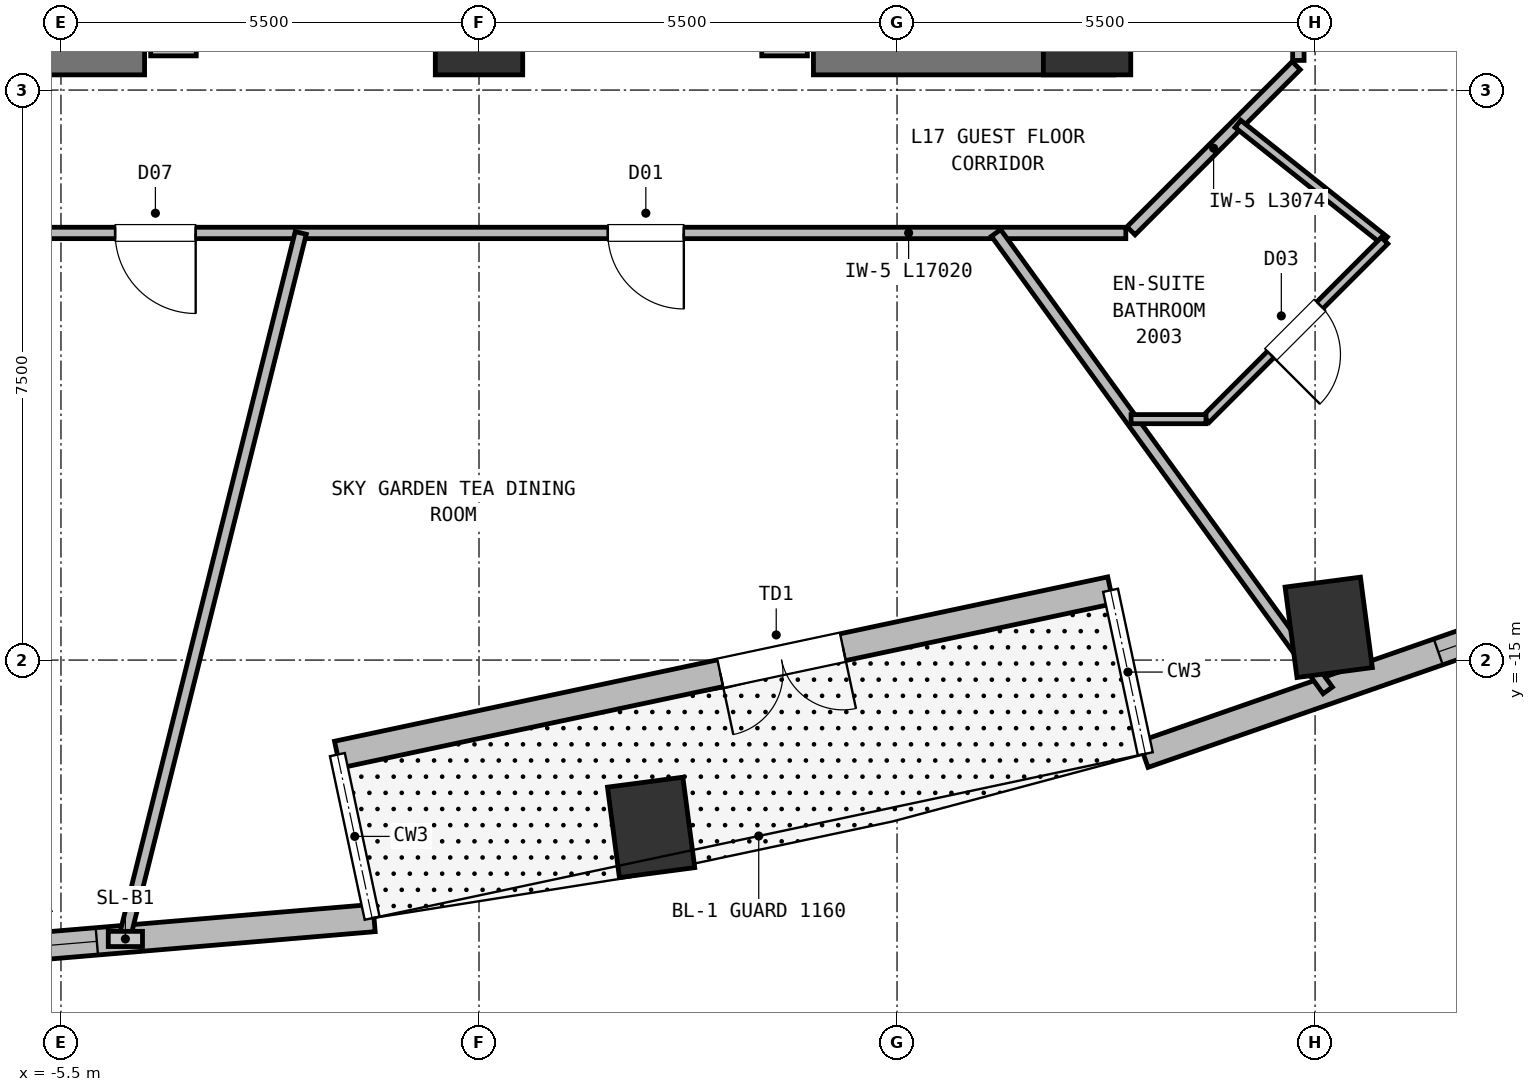
"""IFC4 building model, lengths in metres.
Left out: names, types, materials, properties, quantities, classifications, styles, units other than length and angle.
Written with IfcOpenShell. Run it as: python <this file> out.ifc"""

import sys

from ifc_helpers import new_model, si_unit, direction, frame, frame_2d, origin, origin_2d, place, context, subcontext, project, spatial, rectangle, extrude, element, fill, save


model = new_model("IFC4")
c1 = context("Model", 3, precision=1e-05, world=origin(), true_north=direction((0.0, 1.0)))
c2 = subcontext(c1, "Body", "Model", "MODEL_VIEW")
j1 = project(units=[si_unit("LENGTHUNIT", "METRE"), si_unit("PLANEANGLEUNIT", "RADIAN")], contexts=[c1])
p1 = place(None, origin())
s1 = spatial("IfcSite", under=j1, at=p1, CompositionType="ELEMENT")
p2 = place(p1, origin())
s2 = spatial("IfcBuilding", under=s1, at=p2, CompositionType="ELEMENT")
p3 = place(p2, frame((0.0, 0.0, 71.75)))
s3 = spatial("IfcBuildingStorey", under=s2, at=p3, CompositionType="ELEMENT", Elevation=71.75)
for number, where, z_axis, x_axis in (
    (1, (0.0, -6.6, 0.0), (0.0, 0.0, 1.0), (1.0, 0.0, 0.0)),
    (2, (8.0, -6.6, 0.0), (0.0, 0.0, 1.0), (1.0, 0.0, 0.0)),
):
    element("IfcColumn", number, at=place(p3, frame(where, z_axis=z_axis, x_axis=x_axis)), inside=s3, PredefinedType="COLUMN", context=c2, shape_type="SweptSolid", body=[
        extrude(rectangle(XDim=1.15, YDim=1.4, at=origin_2d()), origin(), (0.0, 0.0, 1.0), 3.75),
    ])
for number, where, z_axis, x_axis in (
    (3, (-8.35, -6.95, 0.0), (0.0, 0.0, 1.0), (1.0, 0.0, 0.0)),
    (4, (4.4, -6.95, 0.0), (0.0, 0.0, 1.0), (1.0, 0.0, 0.0)),
):
    element("IfcWall", number, at=place(p3, frame(where, z_axis=z_axis, x_axis=x_axis)), inside=s3, PredefinedType="SHEAR", context=c2, shape_type="SweptSolid", body=[
        extrude(rectangle(XDim=3.95, YDim=0.7, at=frame_2d((1.975, 0.0))), origin(), (0.0, 0.0, 1.0), 3.5),
    ])
for number, where, z_axis, x_axis in (
    (5, (2.265, -17.202, 0.0), (0.0, 0.0, 1.0), (0.991, 0.131, 0.0)),
    (6, (11.179, -14.569, 0.0), (0.0, 0.0, 1.0), (0.991, 0.131, 0.0)),
):
    element("IfcColumn", number, at=place(p3, frame(where, z_axis=z_axis, x_axis=x_axis)), inside=s3, PredefinedType="COLUMN", context=c2, shape_type="SweptSolid", body=[
        extrude(rectangle(XDim=1.0, YDim=1.2, at=origin_2d()), origin(), (0.0, 0.0, 1.0), 3.75),
    ])
p4 = place(p3, frame((8.309, -14.082, 0.0), z_axis=(0.0, 0.0, 1.0), x_axis=(-0.978145663611, -0.207920804056, 0.0)))
e7 = element("IfcWall", 7, at=p4, inside=s3, PredefinedType="SOLIDWALL", context=c2, shape_type="SweptSolid", body=[
    extrude(rectangle(XDim=10.4, YDim=0.36, at=frame_2d((5.2, 0.0))), origin(), (0.0, 0.0, 1.0), 3.5),
])
p5 = place(p4, frame((3.6, 0.0, 0.0)))
e8 = element("IfcOpeningElement", 8, at=p5, cuts=e7, PredefinedType="OPENING", context=c2, shape_type="SweptSolid", body=[
    extrude(rectangle(XDim=1.65, YDim=2.25, at=frame_2d((0.825, 1.125))), frame((0.0, 0.19, 0.0), z_axis=(0.0, -1.0, 0.0), x_axis=(1.0, 0.0, 0.0)), (0.0, 0.0, 1.0), 0.38),
])
p6 = place(p3, frame((-1.381, -18.394, 0.0), z_axis=(0.0, 0.0, 1.0), x_axis=(-0.996472288139, -0.083922458089, 0.0)))
e9 = element("IfcWall", 9, at=p6, inside=s3, PredefinedType="SOLIDWALL", context=c2, shape_type="SweptSolid", body=[
    extrude(rectangle(XDim=6.566, YDim=0.36, at=frame_2d((3.283, 0.0))), origin(), (0.0, 0.0, 1.0), 3.5),
])
p7 = place(p6, frame((3.66, 0.0, 0.72)))
e10 = element("IfcOpeningElement", 10, at=p7, cuts=e9, PredefinedType="OPENING", context=c2, shape_type="SweptSolid", body=[
    extrude(rectangle(XDim=1.6, YDim=1.88, at=frame_2d((0.8, 0.94))), frame((0.0, 0.19, 0.0), z_axis=(0.0, -1.0, 0.0), x_axis=(1.0, 0.0, 0.0)), (0.0, 0.0, 1.0), 0.38),
])
p8 = place(p3, frame((14.944, -14.084, 0.0), z_axis=(0.0, 0.0, 1.0), x_axis=(-0.944459669929, -0.328627344993, 0.0)))
e11 = element("IfcWall", 11, at=p8, inside=s3, PredefinedType="SOLIDWALL", context=c2, shape_type="SweptSolid", body=[
    extrude(rectangle(XDim=6.566, YDim=0.36, at=frame_2d((3.283, 0.0))), origin(), (0.0, 0.0, 1.0), 2.93),
])
p9 = place(p8, frame((0.86, 0.0, 0.72)))
e12 = element("IfcOpeningElement", 12, at=p9, cuts=e11, PredefinedType="OPENING", context=c2, shape_type="SweptSolid", body=[
    extrude(rectangle(XDim=1.6, YDim=1.88, at=frame_2d((0.8, 0.94))), frame((0.0, 0.19, 0.0), z_axis=(0.0, -1.0, 0.0), x_axis=(1.0, 0.0, 0.0)), (0.0, 0.0, 1.0), 0.38),
])
for number, where, z_axis, x_axis in (
    (13, (-4.32, -6.95, 0.0), (0.0, 0.0, 1.0), (1.0, 0.0, 0.0)),
    (14, (3.72, -6.95, 0.0), (0.0, 0.0, 1.0), (1.0, 0.0, 0.0)),
):
    element("IfcWall", number, at=place(p3, frame(where, z_axis=z_axis, x_axis=x_axis)), inside=s3, PredefinedType="PARTITIONING", context=c2, shape_type="SweptSolid", body=[
        extrude(rectangle(XDim=0.6, YDim=0.2, at=frame_2d((0.3, 0.0))), origin(), (0.0, 0.0, 1.0), 3.5),
    ])
p10 = place(p3, frame((8.51, -9.38, 0.0), z_axis=(0.0, 0.0, 1.0), x_axis=(-1.0, 0.0, 0.0)))
e15 = element("IfcWall", 15, at=p10, inside=s3, PredefinedType="PARTITIONING", context=c2, shape_type="SweptSolid", body=[
    extrude(rectangle(XDim=17.02, YDim=0.15, at=frame_2d((8.51, 0.0))), origin(), (0.0, 0.0, 1.0), 3.5),
])
p11 = place(p10, frame((5.815, 0.0, 0.0)))
e16 = element("IfcOpeningElement", 16, at=p11, cuts=e15, PredefinedType="OPENING", context=c2, shape_type="SweptSolid", body=[
    extrude(rectangle(XDim=1.0, YDim=2.15, at=frame_2d((0.5, 1.075))), frame((0.0, 0.085, 0.0), z_axis=(0.0, -1.0, 0.0), x_axis=(1.0, 0.0, 0.0)), (0.0, 0.0, 1.0), 0.17),
])
p12 = place(p10, frame((12.238, 0.0, 0.0)))
e17 = element("IfcOpeningElement", 17, at=p12, cuts=e15, PredefinedType="OPENING", context=c2, shape_type="SweptSolid", body=[
    extrude(rectangle(XDim=1.06, YDim=2.15, at=frame_2d((0.53, 1.075))), frame((0.0, 0.085, 0.0), z_axis=(0.0, -1.0, 0.0), x_axis=(1.0, 0.0, 0.0)), (0.0, 0.0, 1.0), 0.17),
])
p13 = place(p3, frame((10.752, -7.178, 0.0), z_axis=(0.0, 0.0, 1.0), x_axis=(-0.707067066127, -0.707146494016, 0.0)))
e18 = element("IfcWall", 18, at=p13, inside=s3, PredefinedType="PARTITIONING", context=c2, shape_type="SweptSolid", body=[
    extrude(rectangle(XDim=3.074, YDim=0.15, at=frame_2d((1.537, 0.0))), origin(), (0.0, 0.0, 1.0), 3.12),
])
p14 = place(p3, frame((10.78, 7.11, 0.0), z_axis=(0.0, 0.0, 1.0), x_axis=(0.0, -1.0, 0.0)))
e19 = element("IfcWall", 19, at=p14, inside=s3, PredefinedType="PARTITIONING", context=c2, shape_type="SweptSolid", body=[
    extrude(rectangle(XDim=14.22, YDim=0.15, at=frame_2d((7.11, 0.0))), origin(), (0.0, 0.0, 1.0), 3.12),
])
p15 = place(p14, frame((2.105, 0.0, 0.0)))
e20 = element("IfcOpeningElement", 20, at=p15, cuts=e19, PredefinedType="OPENING", context=c2, shape_type="SweptSolid", body=[
    extrude(rectangle(XDim=1.0, YDim=2.15, at=frame_2d((0.5, 1.075))), frame((0.0, 0.085, 0.0), z_axis=(0.0, -1.0, 0.0), x_axis=(1.0, 0.0, 0.0)), (0.0, 0.0, 1.0), 0.17),
])
p16 = place(p14, frame((12.075, 0.0, 0.0)))
e21 = element("IfcOpeningElement", 21, at=p16, cuts=e19, PredefinedType="OPENING", context=c2, shape_type="SweptSolid", body=[
    extrude(rectangle(XDim=1.06, YDim=2.15, at=frame_2d((0.53, 1.075))), frame((0.0, 0.085, 0.0), z_axis=(0.0, -1.0, 0.0), x_axis=(1.0, 0.0, 0.0)), (0.0, 0.0, 1.0), 0.17),
])
p17 = place(p14, frame((6.074, 0.0, 0.0)))
e22 = element("IfcOpeningElement", 22, at=p17, cuts=e19, PredefinedType="OPENING", context=c2, shape_type="SweptSolid", body=[
    extrude(rectangle(XDim=1.06, YDim=2.15, at=frame_2d((0.53, 1.075))), frame((0.0, 0.085, 0.0), z_axis=(0.0, -1.0, 0.0), x_axis=(1.0, 0.0, 0.0)), (0.0, 0.0, 1.0), 0.17),
])
p18 = place(p3, frame((-2.345, -9.38, 0.0), z_axis=(0.0, 0.0, 1.0), x_axis=(-0.242559617753, -0.970136501651, 0.0)))
e23 = element("IfcWall", 23, at=p18, inside=s3, PredefinedType="PARTITIONING", context=c2, shape_type="SweptSolid", body=[
    extrude(rectangle(XDim=9.577, YDim=0.15, at=frame_2d((4.789, 0.0))), origin(), (0.0, 0.0, 1.0), 3.5),
])
p19 = place(p3, frame((6.802, -9.38, 0.0), z_axis=(0.0, 0.0, 1.0), x_axis=(0.587044518105, -0.809554651499, 0.0)))
e24 = element("IfcWall", 24, at=p19, inside=s3, PredefinedType="PARTITIONING", context=c2, shape_type="SweptSolid", body=[
    extrude(rectangle(XDim=7.435, YDim=0.15, at=frame_2d((3.717, 0.0))), origin(), (0.0, 0.0, 1.0), 3.5),
])
p20 = place(p3, frame((9.985, -7.945, 0.0), z_axis=(0.0, 0.0, 1.0), x_axis=(0.782479351314, -0.622676533015, 0.0)))
e25 = element("IfcWall", 25, at=p20, inside=s3, PredefinedType="PARTITIONING", context=c2, shape_type="SweptSolid", body=[
    extrude(rectangle(XDim=2.466, YDim=0.12, at=frame_2d((1.233, 0.0))), origin(), (0.0, 0.0, 1.0), 3.5),
])
p21 = place(p3, frame((11.915, -9.48, 0.0), z_axis=(0.0, 0.0, 1.0), x_axis=(-0.707106781187, -0.707106781187, 0.0)))
e26 = element("IfcWall", 26, at=p21, inside=s3, PredefinedType="PARTITIONING", context=c2, shape_type="SweptSolid", body=[
    extrude(rectangle(XDim=3.323, YDim=0.12, at=frame_2d((1.662, 0.0))), origin(), (0.0, 0.0, 1.0), 3.5),
])
p22 = place(p21, frame((1.202, 0.0, 0.0)))
e27 = element("IfcOpeningElement", 27, at=p22, cuts=e26, PredefinedType="OPENING", context=c2, shape_type="SweptSolid", body=[
    extrude(rectangle(XDim=0.92, YDim=2.1, at=frame_2d((0.46, 1.05))), frame((0.0, 0.07, 0.0), z_axis=(0.0, -1.0, 0.0), x_axis=(1.0, 0.0, 0.0)), (0.0, 0.0, 1.0), 0.14),
])
p23 = place(p3, frame((8.579, -11.83, 0.0), z_axis=(0.0, 0.0, 1.0), x_axis=(1.0, 0.0, 0.0)))
e28 = element("IfcWall", 28, at=p23, inside=s3, PredefinedType="PARTITIONING", context=c2, shape_type="SweptSolid", body=[
    extrude(rectangle(XDim=0.986, YDim=0.12, at=frame_2d((0.493, 0.0))), origin(), (0.0, 0.0, 1.0), 3.5),
])
p24 = place(p3, frame((10.78, -3.98, 0.0), z_axis=(0.0, 0.0, 1.0), x_axis=(0.938109546053, -0.346338677604, 0.0)))
e29 = element("IfcWall", 29, at=p24, inside=s3, PredefinedType="PARTITIONING", context=c2, shape_type="SweptSolid", body=[
    extrude(rectangle(XDim=14.004, YDim=0.15, at=frame_2d((7.002, 0.0))), origin(), (0.0, 0.0, 1.0), 3.5),
])
p25 = place(p5, origin())
e30 = element("IfcDoor", 30, at=p25, inside=s3, OperationType="DOUBLE_DOOR_SINGLE_SWING", PredefinedType="DOOR", context=c2, shape_type="SweptSolid", body=[
    extrude(rectangle(XDim=1.65, YDim=2.25, at=frame_2d((0.825, 1.125))), frame((0.0, 0.025, 0.0), z_axis=(0.0, -1.0, 0.0), x_axis=(1.0, 0.0, 0.0)), (0.0, 0.0, 1.0), 0.05),
])
fill(e8, e30)
p26 = place(p7, origin())
e31 = element("IfcWindow", 31, at=p26, inside=s3, PartitioningType="SINGLE_PANEL", PredefinedType="WINDOW", context=c2, shape_type="SweptSolid", body=[
    extrude(rectangle(XDim=1.6, YDim=1.88, at=frame_2d((0.8, 0.94))), frame((0.0, 0.03, 0.0), z_axis=(0.0, -1.0, 0.0), x_axis=(1.0, 0.0, 0.0)), (0.0, 0.0, 1.0), 0.06),
])
fill(e10, e31)
p27 = place(p9, origin())
e32 = element("IfcWindow", 32, at=p27, inside=s3, PartitioningType="SINGLE_PANEL", PredefinedType="WINDOW", context=c2, shape_type="SweptSolid", body=[
    extrude(rectangle(XDim=1.6, YDim=1.88, at=frame_2d((0.8, 0.94))), frame((0.0, 0.03, 0.0), z_axis=(0.0, -1.0, 0.0), x_axis=(1.0, 0.0, 0.0)), (0.0, 0.0, 1.0), 0.06),
])
fill(e12, e32)
p28 = place(p22, origin())
e33 = element("IfcDoor", 33, at=p28, inside=s3, OperationType="SINGLE_SWING_RIGHT", PredefinedType="DOOR", context=c2, shape_type="SweptSolid", body=[
    extrude(rectangle(XDim=0.92, YDim=2.1, at=frame_2d((0.46, 1.05))), frame((0.0, 0.025, 0.0), z_axis=(0.0, -1.0, 0.0), x_axis=(1.0, 0.0, 0.0)), (0.0, 0.0, 1.0), 0.05),
])
fill(e27, e33)
p29 = place(p11, origin())
e34 = element("IfcDoor", 34, at=p29, inside=s3, OperationType="SINGLE_SWING_LEFT", PredefinedType="DOOR", context=c2, shape_type="SweptSolid", body=[
    extrude(rectangle(XDim=1.0, YDim=2.15, at=frame_2d((0.5, 1.075))), frame((0.0, 0.025, 0.0), z_axis=(0.0, -1.0, 0.0), x_axis=(1.0, 0.0, 0.0)), (0.0, 0.0, 1.0), 0.05),
])
fill(e16, e34)
p30 = place(p12, origin())
e35 = element("IfcDoor", 35, at=p30, inside=s3, OperationType="SINGLE_SWING_LEFT", PredefinedType="DOOR", context=c2, shape_type="SweptSolid", body=[
    extrude(rectangle(XDim=1.06, YDim=2.15, at=frame_2d((0.53, 1.075))), frame((0.0, 0.025, 0.0), z_axis=(0.0, -1.0, 0.0), x_axis=(1.0, 0.0, 0.0)), (0.0, 0.0, 1.0), 0.05),
])
fill(e17, e35)
save(model, sys.argv[1])
